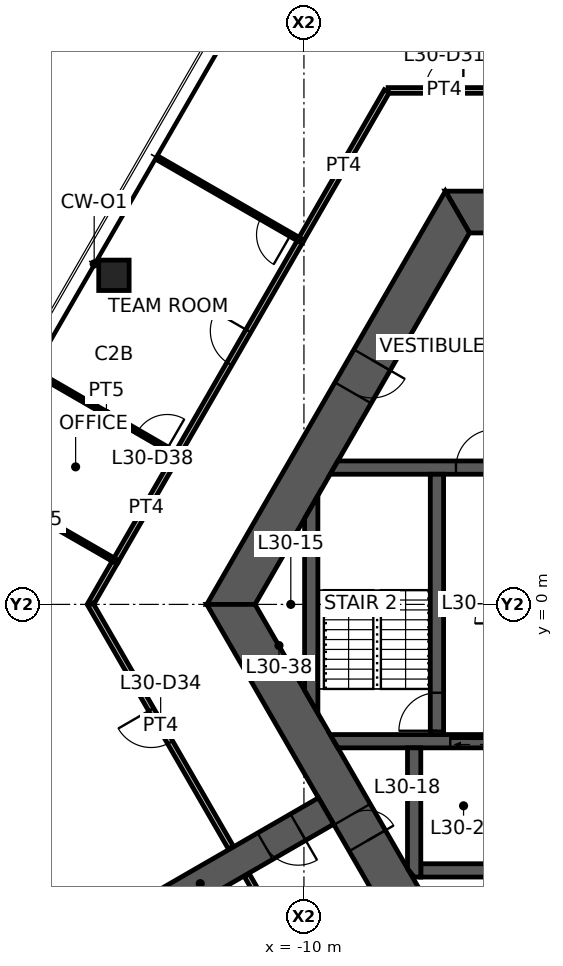
"""IFC4 building model, lengths in metres.
Left out: names, types, materials, properties, quantities, classifications, styles, units other than length and angle.
Written with IfcOpenShell. Run it as: python <this file> out.ifc"""

import sys

from ifc_helpers import new_model, si_unit, direction, frame, frame_2d, origin, origin_2d, place, context, subcontext, project, spatial, polyline, rectangle, hollow_rectangle, outline, extrude, element, fill, save


model = new_model("IFC4")
c1 = context("Model", 3, precision=1e-05, world=origin(), true_north=direction((0.0, 1.0)))
c2 = subcontext(c1, "Body", "Model", "MODEL_VIEW")
j1 = project(units=[si_unit("LENGTHUNIT", "METRE"), si_unit("PLANEANGLEUNIT", "RADIAN")], contexts=[c1])
p1 = place(None, origin())
s1 = spatial("IfcSite", under=j1, at=p1, CompositionType="ELEMENT")
p2 = place(p1, origin())
s2 = spatial("IfcBuilding", under=s1, at=p2, CompositionType="ELEMENT")
p3 = place(p2, frame((0.0, 0.0, 119.7)))
s3 = spatial("IfcBuildingStorey", under=s2, at=p3, CompositionType="ELEMENT", Elevation=119.7)
p4 = place(p3, frame((-15.0, 8.66, 0.0), z_axis=(0.0, 0.0, 1.0), x_axis=(1.0, 0.0, 0.0)))
e1 = element("IfcColumn", 1, at=p4, inside=s3, PredefinedType="COLUMN", context=c2, shape_type="SweptSolid", body=[
    extrude(hollow_rectangle(XDim=0.8, YDim=0.8, WallThickness=0.045, at=origin_2d()), origin(), (0.0, 0.0, 1.0), 3.9),
])
p5 = place(p3, frame((5.961, 10.325, 0.0), z_axis=(0.0, 0.0, 1.0), x_axis=(-1.0, 0.0, 0.0)))
e2 = element("IfcWall", 2, at=p5, inside=s3, PredefinedType="SHEAR", context=c2, shape_type="SweptSolid", body=[
    extrude(outline(polyline([(-0.318, -0.55), (4.599, -0.55), (5.499, -0.55), (6.424, -0.55), (7.323, -0.55), (12.24, -0.55), (11.605, 0.55), (7.323, 0.55), (6.424, 0.55), (5.499, 0.55), (4.599, 0.55), (0.318, 0.55), (-0.318, -0.55)])), origin(), (0.0, 0.0, 1.0), 3.9),
])
p6 = place(p5, frame((6.424, 0.0, 0.0)))
e3 = element("IfcOpeningElement", 3, at=p6, cuts=e2, PredefinedType="OPENING", context=c2, shape_type="SweptSolid", body=[
    extrude(rectangle(XDim=0.9, YDim=2.1, at=frame_2d((0.45, 1.05))), frame((0.0, 0.56, 0.0), z_axis=(0.0, -1.0, 0.0), x_axis=(1.0, 0.0, 0.0)), (0.0, 0.0, 1.0), 1.12),
])
p7 = place(p5, frame((4.599, 0.0, 0.0)))
e4 = element("IfcOpeningElement", 4, at=p7, cuts=e2, PredefinedType="OPENING", context=c2, shape_type="SweptSolid", body=[
    extrude(rectangle(XDim=0.9, YDim=2.1, at=frame_2d((0.45, 1.05))), frame((0.0, 0.56, 0.0), z_axis=(0.0, -1.0, 0.0), x_axis=(1.0, 0.0, 0.0)), (0.0, 0.0, 1.0), 1.12),
])
p8 = place(p3, frame((-5.961, 10.325, 0.0), z_axis=(0.0, 0.0, 1.0), x_axis=(-0.500004296715, -0.866022923061, 0.0)))
e5 = element("IfcWall", 5, at=p8, inside=s3, PredefinedType="SHEAR", context=c2, shape_type="SweptSolid", body=[
    extrude(outline(polyline([(-0.318, -0.55), (4.494, -0.55), (5.494, -0.55), (12.24, -0.55), (11.605, 0.55), (5.494, 0.55), (4.494, 0.55), (0.318, 0.55), (-0.318, -0.55)])), origin(), (0.0, 0.0, 1.0), 3.9),
])
p9 = place(p8, frame((4.494, 0.0, 0.0)))
e6 = element("IfcOpeningElement", 6, at=p9, cuts=e5, PredefinedType="OPENING", context=c2, shape_type="SweptSolid", body=[
    extrude(rectangle(XDim=1.0, YDim=2.1, at=frame_2d((0.5, 1.05))), frame((0.0, 0.56, 0.0), z_axis=(0.0, -1.0, 0.0), x_axis=(1.0, 0.0, 0.0)), (0.0, 0.0, 1.0), 1.12),
])
p10 = place(p3, frame((-11.922, 0.0, 0.0), z_axis=(0.0, 0.0, 1.0), x_axis=(0.500004296715, -0.866022923061, 0.0)))
e7 = element("IfcWall", 7, at=p10, inside=s3, PredefinedType="SHEAR", context=c2, shape_type="SweptSolid", body=[
    extrude(outline(polyline([(-0.318, -0.55), (6.381, -0.55), (7.181, -0.55), (12.24, -0.55), (11.605, 0.55), (7.181, 0.55), (6.381, 0.55), (0.318, 0.55), (-0.318, -0.55)])), origin(), (0.0, 0.0, 1.0), 3.9),
])
p11 = place(p10, frame((6.381, 0.0, 0.0)))
e8 = element("IfcOpeningElement", 8, at=p11, cuts=e7, PredefinedType="OPENING", context=c2, shape_type="SweptSolid", body=[
    extrude(rectangle(XDim=0.8, YDim=2.1, at=frame_2d((0.4, 1.05))), frame((0.0, 0.56, 0.0), z_axis=(0.0, -1.0, 0.0), x_axis=(1.0, 0.0, 0.0)), (0.0, 0.0, 1.0), 1.12),
])
p12 = place(p3, frame((-9.418, -5.438, 0.0), z_axis=(0.0, 0.0, 1.0), x_axis=(-0.866029782078, -0.499992416496, 0.0)))
e9 = element("IfcWall", 9, at=p12, inside=s3, PredefinedType="SHEAR", context=c2, shape_type="SweptSolid", body=[
    extrude(rectangle(XDim=7.646, YDim=0.8, at=frame_2d((3.823, 0.0))), origin(), (0.0, 0.0, 1.0), 3.9),
])
p13 = place(p12, frame((0.85, 0.0, 0.0)))
e10 = element("IfcOpeningElement", 10, at=p13, cuts=e9, PredefinedType="OPENING", context=c2, shape_type="SweptSolid", body=[
    extrude(rectangle(XDim=1.0, YDim=2.1, at=frame_2d((0.5, 1.05))), frame((0.0, 0.41, 0.0), z_axis=(0.0, -1.0, 0.0), x_axis=(1.0, 0.0, 0.0)), (0.0, 0.0, 1.0), 0.82),
])
p14 = place(p3, frame((-9.209, 3.6, 0.0), z_axis=(0.0, 0.0, 1.0), x_axis=(1.0, 0.0, 0.0)))
e11 = element("IfcWall", 11, at=p14, inside=s3, PredefinedType="SHEAR", context=c2, shape_type="SweptSolid", body=[
    extrude(outline(polyline([(-0.101, -0.175), (3.209, -0.175), (4.209, -0.175), (5.609, -0.175), (6.709, -0.175), (7.784, -0.175), (7.784, 0.175), (6.709, 0.175), (5.609, 0.175), (4.209, 0.175), (3.209, 0.175), (0.101, 0.175), (-0.101, -0.175)])), origin(), (0.0, 0.0, 1.0), 3.9),
])
p15 = place(p14, frame((3.209, 0.0, 0.0)))
e12 = element("IfcOpeningElement", 12, at=p15, cuts=e11, PredefinedType="OPENING", context=c2, shape_type="SweptSolid", body=[
    extrude(rectangle(XDim=1.0, YDim=2.1, at=frame_2d((0.5, 1.05))), frame((0.0, 0.185, 0.0), z_axis=(0.0, -1.0, 0.0), x_axis=(1.0, 0.0, 0.0)), (0.0, 0.0, 1.0), 0.37),
])
p16 = place(p14, frame((5.609, 0.0, 0.0)))
e13 = element("IfcOpeningElement", 13, at=p16, cuts=e11, PredefinedType="OPENING", context=c2, shape_type="SweptSolid", body=[
    extrude(rectangle(XDim=1.1, YDim=2.1, at=frame_2d((0.55, 1.05))), frame((0.0, 0.185, 0.0), z_axis=(0.0, -1.0, 0.0), x_axis=(1.0, 0.0, 0.0)), (0.0, 0.0, 1.0), 0.37),
])
p17 = place(p3, frame((-9.209, -3.6, 0.0), z_axis=(0.0, 0.0, 1.0), x_axis=(1.0, 0.0, 0.0)))
e14 = element("IfcWall", 14, at=p17, inside=s3, PredefinedType="SHEAR", context=c2, shape_type="SweptSolid", body=[
    extrude(outline(polyline([(0.101, -0.175), (3.059, -0.175), (4.359, -0.175), (5.609, -0.175), (6.709, -0.175), (7.784, -0.175), (7.784, 0.175), (6.709, 0.175), (5.609, 0.175), (4.359, 0.175), (3.059, 0.175), (-0.101, 0.175), (0.101, -0.175)])), origin(), (0.0, 0.0, 1.0), 3.9),
])
p18 = place(p17, frame((5.609, 0.0, 0.0)))
e15 = element("IfcOpeningElement", 15, at=p18, cuts=e14, PredefinedType="OPENING", context=c2, shape_type="SweptSolid", body=[
    extrude(rectangle(XDim=1.1, YDim=2.1, at=frame_2d((0.55, 1.05))), frame((0.0, 0.185, 0.0), z_axis=(0.0, -1.0, 0.0), x_axis=(1.0, 0.0, 0.0)), (0.0, 0.0, 1.0), 0.37),
])
p19 = place(p17, frame((3.059, 0.0, 0.0)))
e16 = element("IfcOpeningElement", 16, at=p19, cuts=e14, PredefinedType="OPENING", context=c2, shape_type="SweptSolid", body=[
    extrude(rectangle(XDim=1.3, YDim=2.1, at=frame_2d((0.65, 1.05))), frame((0.0, 0.185, 0.0), z_axis=(0.0, -1.0, 0.0), x_axis=(1.0, 0.0, 0.0)), (0.0, 0.0, 1.0), 0.37),
])
p20 = place(p3, frame((-6.5, -3.425, 0.0), z_axis=(0.0, 0.0, 1.0), x_axis=(0.0, 1.0, 0.0)))
e17 = element("IfcWall", 17, at=p20, inside=s3, PredefinedType="SHEAR", context=c2, shape_type="SweptSolid", body=[
    extrude(rectangle(XDim=6.85, YDim=0.35, at=frame_2d((3.425, 0.0))), origin(), (0.0, 0.0, 1.0), 3.9),
])
p21 = place(p20, frame((0.1, 0.0, 0.0)))
e18 = element("IfcOpeningElement", 18, at=p21, cuts=e17, PredefinedType="OPENING", context=c2, shape_type="SweptSolid", body=[
    extrude(rectangle(XDim=1.0, YDim=2.1, at=frame_2d((0.5, 1.05))), frame((0.0, 0.185, 0.0), z_axis=(0.0, -1.0, 0.0), x_axis=(1.0, 0.0, 0.0)), (0.0, 0.0, 1.0), 0.37),
])
p22 = place(p3, frame((-6.925, -7.0, 0.0), z_axis=(0.0, 0.0, 1.0), x_axis=(1.0, 0.0, 0.0)))
e19 = element("IfcWall", 19, at=p22, inside=s3, PredefinedType="SHEAR", context=c2, shape_type="SweptSolid", body=[
    extrude(rectangle(XDim=2.25, YDim=0.35, at=frame_2d((1.125, 0.0))), origin(), (0.0, 0.0, 1.0), 3.9),
])
p23 = place(p3, frame((-7.1, -3.775, 0.0), z_axis=(0.0, 0.0, 1.0), x_axis=(0.0, -1.0, 0.0)))
e20 = element("IfcWall", 20, at=p23, inside=s3, PredefinedType="SHEAR", context=c2, shape_type="SweptSolid", body=[
    extrude(outline(polyline([(0.0, -0.175), (3.175, -0.175), (3.4, 0.0), (3.4, 0.175), (0.0, 0.175), (0.0, -0.175)])), origin(), (0.0, 0.0, 1.0), 3.9),
])
p24 = place(p3, frame((-9.808, -2.562, 0.0), z_axis=(0.0, 0.0, 1.0), x_axis=(0.0, 1.0, 0.0)))
e21 = element("IfcWall", 21, at=p24, inside=s3, PredefinedType="SHEAR", context=c2, shape_type="SweptSolid", body=[
    extrude(outline(polyline([(-0.303, -0.175), (5.428, -0.175), (4.821, 0.175), (0.303, 0.175), (-0.303, -0.175)])), origin(), (0.0, 0.0, 1.0), 3.9),
])
p25 = place(p3, frame((-7.786, 13.525, 0.0), z_axis=(0.0, 0.0, 1.0), x_axis=(1.0, 0.0, 0.0)))
e22 = element("IfcWall", 22, at=p25, inside=s3, PredefinedType="PARTITIONING", context=c2, shape_type="SweptSolid", body=[
    extrude(rectangle(XDim=2.961, YDim=0.15, at=frame_2d((1.48, 0.0))), origin(), (0.0, 0.0, 1.0), 2.35),
])
p26 = place(p25, frame((0.981, 0.0, 0.0)))
e23 = element("IfcOpeningElement", 23, at=p26, cuts=e22, PredefinedType="OPENING", context=c2, shape_type="SweptSolid", body=[
    extrude(rectangle(XDim=1.0, YDim=2.1, at=frame_2d((0.5, 1.05))), frame((0.0, 0.085, 0.0), z_axis=(0.0, -1.0, 0.0), x_axis=(1.0, 0.0, 0.0)), (0.0, 0.0, 1.0), 0.17),
])
p27 = place(p3, frame((-10.092, 9.57, 0.0), z_axis=(0.0, 0.0, 1.0), x_axis=(0.499987549055, 0.866032592222, 0.0)))
e24 = element("IfcWall", 24, at=p27, inside=s3, PredefinedType="PARTITIONING", context=c2, shape_type="SweptSolid", body=[
    extrude(rectangle(XDim=4.544, YDim=0.15, at=frame_2d((2.272, 0.0))), origin(), (0.0, 0.0, 1.0), 2.35),
])
p28 = place(p3, frame((-14.962, 1.135, 0.0), z_axis=(0.0, 0.0, 1.0), x_axis=(0.500001520505, 0.866024525919, 0.0)))
e25 = element("IfcWall", 25, at=p28, inside=s3, PredefinedType="PARTITIONING", context=c2, shape_type="SweptSolid", body=[
    extrude(rectangle(XDim=3.256, YDim=0.15, at=frame_2d((1.628, 0.0))), origin(), (0.0, 0.0, 1.0), 2.35),
])
p29 = place(p3, frame((-15.617, 0.0, 0.0), z_axis=(0.0, 0.0, 1.0), x_axis=(0.499898558967, 0.866083962871, 0.0)))
e26 = element("IfcWall", 26, at=p29, inside=s3, PredefinedType="PARTITIONING", context=c2, shape_type="SweptSolid", body=[
    extrude(rectangle(XDim=1.32, YDim=0.15, at=frame_2d((0.66, 0.0))), origin(), (0.0, 0.0, 1.0), 2.35),
])
p30 = place(p3, frame((-11.923, -6.399, 0.0), z_axis=(0.0, 0.0, 1.0), x_axis=(-0.499980837837, 0.866036466782, 0.0)))
e27 = element("IfcWall", 27, at=p30, inside=s3, PredefinedType="PARTITIONING", context=c2, shape_type="SweptSolid", body=[
    extrude(rectangle(XDim=7.388, YDim=0.15, at=frame_2d((3.694, 0.0))), origin(), (0.0, 0.0, 1.0), 2.35),
])
p31 = place(p30, frame((3.194, 0.0, 0.0)))
e28 = element("IfcOpeningElement", 28, at=p31, cuts=e27, PredefinedType="OPENING", context=c2, shape_type="SweptSolid", body=[
    extrude(rectangle(XDim=1.0, YDim=2.1, at=frame_2d((0.5, 1.05))), frame((0.0, 0.085, 0.0), z_axis=(0.0, -1.0, 0.0), x_axis=(1.0, 0.0, 0.0)), (0.0, 0.0, 1.0), 0.17),
])
p32 = place(p3, frame((-13.338, 3.947, 0.0), z_axis=(0.0, 0.0, 1.0), x_axis=(0.49998791073, 0.866032383415, 0.0)))
e29 = element("IfcWall", 29, at=p32, inside=s3, PredefinedType="PARTITIONING", context=c2, shape_type="SweptSolid", body=[
    extrude(rectangle(XDim=6.502, YDim=0.15, at=frame_2d((3.251, 0.0))), origin(), (0.0, 0.0, 1.0), 2.35),
])
p33 = place(p32, frame((2.751, 0.0, 0.0)))
e30 = element("IfcOpeningElement", 30, at=p33, cuts=e29, PredefinedType="OPENING", context=c2, shape_type="SweptSolid", body=[
    extrude(rectangle(XDim=1.0, YDim=2.1, at=frame_2d((0.5, 1.05))), frame((0.0, 0.085, 0.0), z_axis=(0.0, -1.0, 0.0), x_axis=(1.0, 0.0, 0.0)), (0.0, 0.0, 1.0), 0.17),
])
p34 = place(p3, frame((-10.088, 9.578, 0.0), z_axis=(0.0, 0.0, 1.0), x_axis=(-0.866555067673, 0.499081470994, 0.0)))
e31 = element("IfcWall", 31, at=p34, inside=s3, PredefinedType="PARTITIONING", context=c2, shape_type="SweptSolid", body=[
    extrude(rectangle(XDim=4.321, YDim=0.1, at=frame_2d((2.16, 0.0))), origin(), (0.0, 0.0, 1.0), 2.35),
])
p35 = place(p34, frame((0.3, 0.0, 0.0)))
e32 = element("IfcOpeningElement", 32, at=p35, cuts=e31, PredefinedType="OPENING", context=c2, shape_type="SweptSolid", body=[
    extrude(rectangle(XDim=0.9, YDim=2.1, at=frame_2d((0.45, 1.05))), frame((0.0, 0.06, 0.0), z_axis=(0.0, -1.0, 0.0), x_axis=(1.0, 0.0, 0.0)), (0.0, 0.0, 1.0), 0.12),
])
p36 = place(p3, frame((-14.957, 1.143, 0.0), z_axis=(0.0, 0.0, 1.0), x_axis=(-0.86652666665, 0.499130780441, 0.0)))
e33 = element("IfcWall", 33, at=p36, inside=s3, PredefinedType="PARTITIONING", context=c2, shape_type="SweptSolid", body=[
    extrude(rectangle(XDim=4.275, YDim=0.1, at=frame_2d((2.138, 0.0))), origin(), (0.0, 0.0, 1.0), 2.35),
])
p37 = place(p3, frame((-17.056, 6.099, 0.0), z_axis=(0.0, 0.0, 1.0), x_axis=(0.865505397626, -0.500899597405, 0.0)))
e34 = element("IfcWall", 34, at=p37, inside=s3, PredefinedType="PARTITIONING", context=c2, shape_type="SweptSolid", body=[
    extrude(rectangle(XDim=4.295, YDim=0.1, at=frame_2d((2.148, 0.0))), origin(), (0.0, 0.0, 1.0), 2.35),
])
p38 = place(p37, frame((3.095, 0.0, 0.0)))
e35 = element("IfcOpeningElement", 35, at=p38, cuts=e34, PredefinedType="OPENING", context=c2, shape_type="SweptSolid", body=[
    extrude(rectangle(XDim=0.9, YDim=2.1, at=frame_2d((0.45, 1.05))), frame((0.0, 0.06, 0.0), z_axis=(0.0, -1.0, 0.0), x_axis=(1.0, 0.0, 0.0)), (0.0, 0.0, 1.0), 0.12),
])
p39 = place(p3, frame((-10.911, -8.152, 0.0), z_axis=(0.0, 0.0, 1.0), x_axis=(-0.499841408252, 0.866116947413, 0.0)))
e36 = element("IfcWall", 36, at=p39, inside=s3, PredefinedType="PARTITIONING", context=c2, shape_type="SweptSolid", body=[
    extrude(rectangle(XDim=1.185, YDim=0.15, at=frame_2d((0.592, 0.0))), origin(), (0.0, 0.0, 1.0), 2.35),
])
p40 = place(p11, origin())
e37 = element("IfcDoor", 37, at=p40, inside=s3, OperationType="SINGLE_SWING_RIGHT", PredefinedType="DOOR", context=c2, shape_type="SweptSolid", body=[
    extrude(rectangle(XDim=0.8, YDim=2.1, at=frame_2d((0.4, 1.05))), frame((0.0, 0.025, 0.0), z_axis=(0.0, -1.0, 0.0), x_axis=(1.0, 0.0, 0.0)), (0.0, 0.0, 1.0), 0.05),
])
fill(e8, e37)
p41 = place(p9, origin())
e38 = element("IfcDoor", 38, at=p41, inside=s3, OperationType="SINGLE_SWING_LEFT", PredefinedType="DOOR", context=c2, shape_type="SweptSolid", body=[
    extrude(rectangle(XDim=1.0, YDim=2.1, at=frame_2d((0.5, 1.05))), frame((0.0, 0.025, 0.0), z_axis=(0.0, -1.0, 0.0), x_axis=(1.0, 0.0, 0.0)), (0.0, 0.0, 1.0), 0.05),
])
fill(e6, e38)
p42 = place(p21, origin())
e39 = element("IfcDoor", 39, at=p42, inside=s3, OperationType="SINGLE_SWING_LEFT", PredefinedType="DOOR", context=c2, shape_type="SweptSolid", body=[
    extrude(rectangle(XDim=1.0, YDim=2.1, at=frame_2d((0.5, 1.05))), frame((0.0, 0.025, 0.0), z_axis=(0.0, -1.0, 0.0), x_axis=(1.0, 0.0, 0.0)), (0.0, 0.0, 1.0), 0.05),
])
fill(e18, e39)
p43 = place(p15, origin())
e40 = element("IfcDoor", 40, at=p43, inside=s3, OperationType="SINGLE_SWING_RIGHT", PredefinedType="DOOR", context=c2, shape_type="SweptSolid", body=[
    extrude(rectangle(XDim=1.0, YDim=2.1, at=frame_2d((0.5, 1.05))), frame((0.0, 0.025, 0.0), z_axis=(0.0, -1.0, 0.0), x_axis=(1.0, 0.0, 0.0)), (0.0, 0.0, 1.0), 0.05),
])
fill(e12, e40)
p44 = place(p13, origin())
e41 = element("IfcDoor", 41, at=p44, inside=s3, OperationType="SINGLE_SWING_LEFT", PredefinedType="DOOR", context=c2, shape_type="SweptSolid", body=[
    extrude(rectangle(XDim=1.0, YDim=2.1, at=frame_2d((0.5, 1.05))), frame((0.0, 0.025, 0.0), z_axis=(0.0, -1.0, 0.0), x_axis=(1.0, 0.0, 0.0)), (0.0, 0.0, 1.0), 0.05),
])
fill(e10, e41)
p45 = place(p26, origin())
e42 = element("IfcDoor", 42, at=p45, inside=s3, OperationType="SINGLE_SWING_RIGHT", PredefinedType="DOOR", context=c2, shape_type="SweptSolid", body=[
    extrude(rectangle(XDim=1.0, YDim=2.1, at=frame_2d((0.5, 1.05))), frame((0.0, 0.025, 0.0), z_axis=(0.0, -1.0, 0.0), x_axis=(1.0, 0.0, 0.0)), (0.0, 0.0, 1.0), 0.05),
])
fill(e23, e42)
p46 = place(p31, origin())
e43 = element("IfcDoor", 43, at=p46, inside=s3, OperationType="SINGLE_SWING_RIGHT", PredefinedType="DOOR", context=c2, shape_type="SweptSolid", body=[
    extrude(rectangle(XDim=1.0, YDim=2.1, at=frame_2d((0.5, 1.05))), frame((0.0, 0.025, 0.0), z_axis=(0.0, -1.0, 0.0), x_axis=(1.0, 0.0, 0.0)), (0.0, 0.0, 1.0), 0.05),
])
fill(e28, e43)
p47 = place(p33, origin())
e44 = element("IfcDoor", 44, at=p47, inside=s3, OperationType="SINGLE_SWING_RIGHT", PredefinedType="DOOR", context=c2, shape_type="SweptSolid", body=[
    extrude(rectangle(XDim=1.0, YDim=2.1, at=frame_2d((0.5, 1.05))), frame((0.0, 0.025, 0.0), z_axis=(0.0, -1.0, 0.0), x_axis=(1.0, 0.0, 0.0)), (0.0, 0.0, 1.0), 0.05),
])
fill(e30, e44)
p48 = place(p35, origin())
e45 = element("IfcDoor", 45, at=p48, inside=s3, OperationType="SINGLE_SWING_LEFT", PredefinedType="DOOR", context=c2, shape_type="SweptSolid", body=[
    extrude(rectangle(XDim=0.9, YDim=2.1, at=frame_2d((0.45, 1.05))), frame((0.0, 0.025, 0.0), z_axis=(0.0, -1.0, 0.0), x_axis=(1.0, 0.0, 0.0)), (0.0, 0.0, 1.0), 0.05),
])
fill(e32, e45)
p49 = place(p38, origin())
e46 = element("IfcDoor", 46, at=p49, inside=s3, OperationType="SINGLE_SWING_RIGHT", PredefinedType="DOOR", context=c2, shape_type="SweptSolid", body=[
    extrude(rectangle(XDim=0.9, YDim=2.1, at=frame_2d((0.45, 1.05))), frame((0.0, 0.025, 0.0), z_axis=(0.0, -1.0, 0.0), x_axis=(1.0, 0.0, 0.0)), (0.0, 0.0, 1.0), 0.05),
])
fill(e35, e46)
p50 = place(p19, origin())
e47 = element("IfcDoor", 47, at=p50, inside=s3, OperationType="DOUBLE_DOOR_SLIDING", PredefinedType="DOOR", context=c2, shape_type="SweptSolid", body=[
    extrude(rectangle(XDim=1.3, YDim=2.1, at=frame_2d((0.65, 1.05))), frame((0.0, 0.025, 0.0), z_axis=(0.0, -1.0, 0.0), x_axis=(1.0, 0.0, 0.0)), (0.0, 0.0, 1.0), 0.05),
])
fill(e16, e47)
save(model, sys.argv[1])
